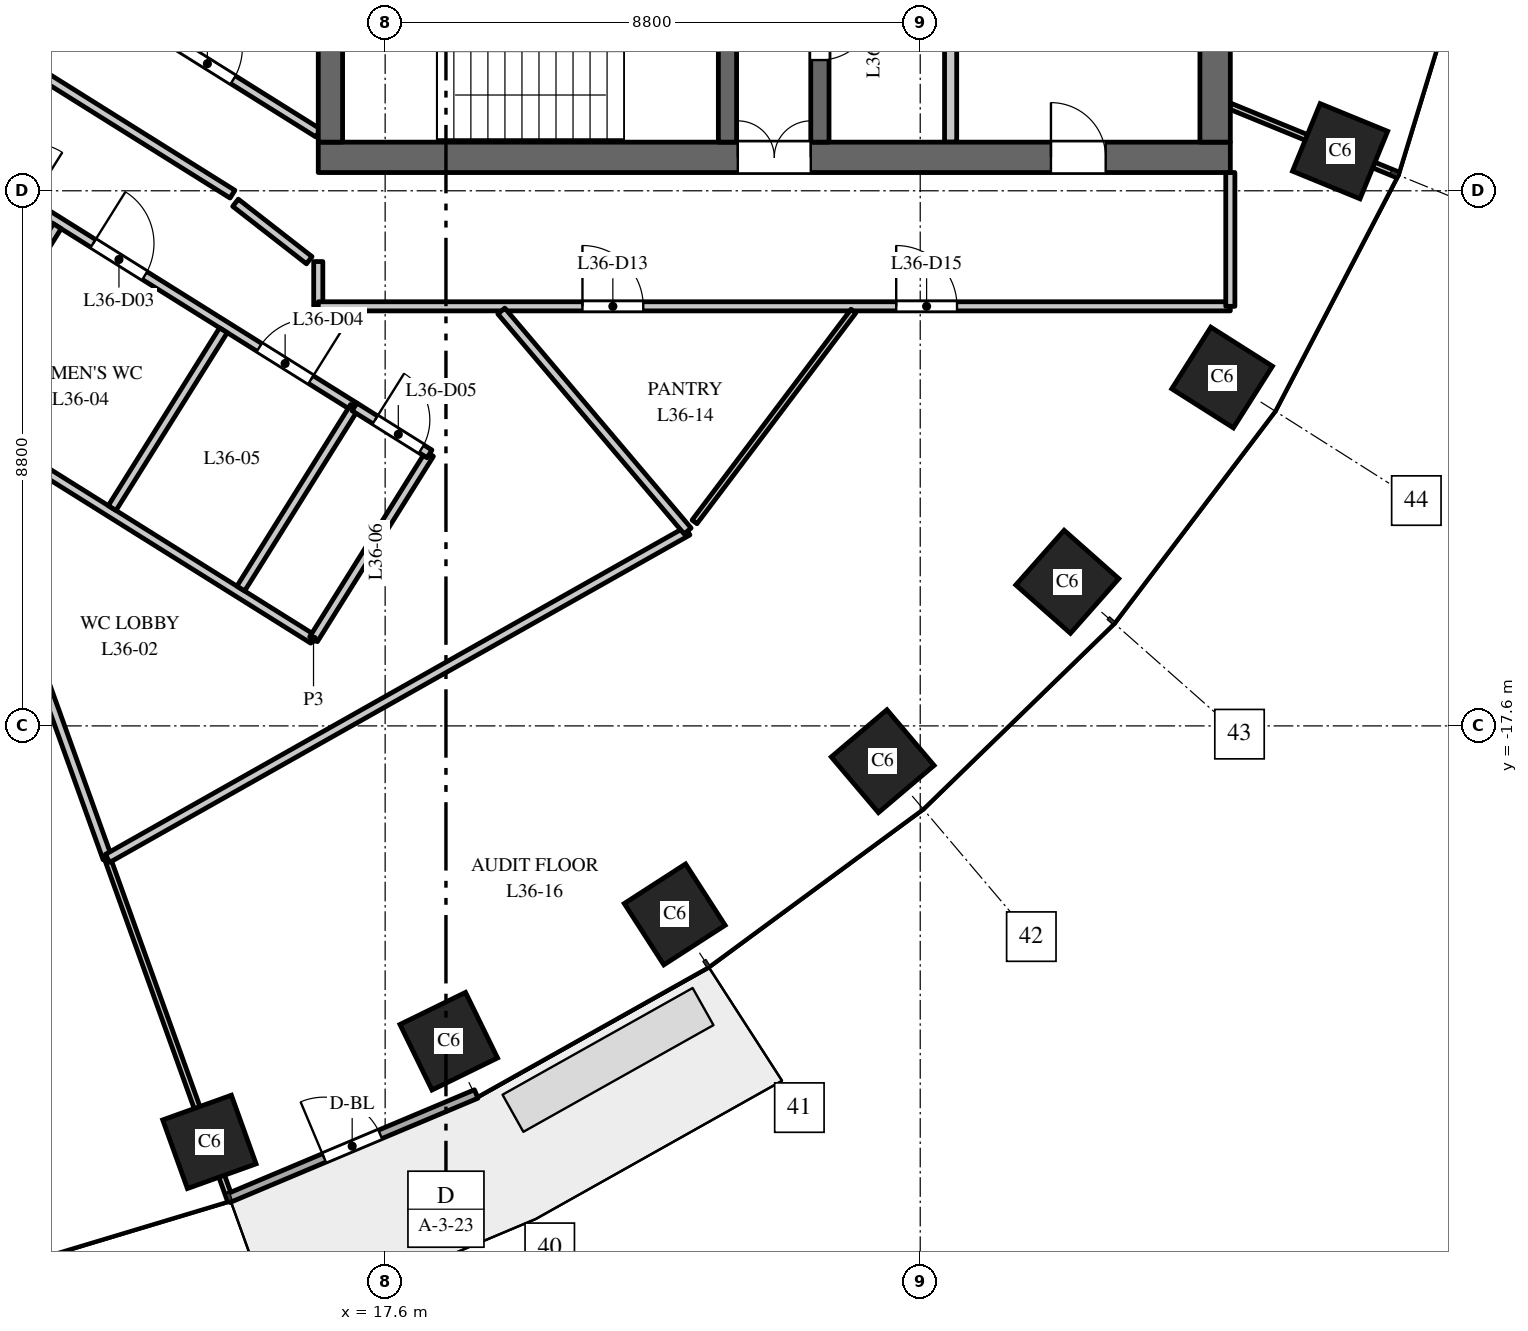
"""IFC4 building model, lengths in metres.
Left out: names, types, materials, properties, quantities, classifications, styles, units other than length and angle.
Written with IfcOpenShell. Run it as: python <this file> out.ifc"""

import sys

from ifc_helpers import new_model, si_unit, direction, frame, frame_2d, origin, origin_2d, place, context, subcontext, project, spatial, rectangle, extrude, element, fill, save


model = new_model("IFC4")
c1 = context("Model", 3, precision=1e-05, world=origin(), true_north=direction((0.0, 1.0)))
c2 = subcontext(c1, "Body", "Model", "MODEL_VIEW")
j1 = project(units=[si_unit("LENGTHUNIT", "METRE"), si_unit("PLANEANGLEUNIT", "RADIAN")], contexts=[c1])
p1 = place(None, origin())
s1 = spatial("IfcSite", under=j1, at=p1, CompositionType="ELEMENT")
p2 = place(p1, origin())
s2 = spatial("IfcBuilding", under=s1, at=p2, CompositionType="ELEMENT")
p3 = place(p2, frame((0.0, 0.0, 158.0)))
s3 = spatial("IfcBuildingStorey", under=s2, at=p3, CompositionType="ELEMENT", Elevation=158.0)
for number, where, z_axis, x_axis in (
    (1, (14.709, -24.441, 0.0), (0.0, 0.0, 1.0), (0.941, 0.338, 0.0)),
    (2, (18.646, -22.785, 0.0), (0.0, 0.0, 1.0), (0.898, 0.439, 0.0)),
    (3, (22.362, -20.7, 0.0), (0.0, 0.0, 1.0), (0.84, 0.542, 0.0)),
    (4, (25.783, -18.18, 0.0), (0.0, 0.0, 1.0), (0.763, 0.646, 0.0)),
    (5, (28.819, -15.23, 0.0), (0.0, 0.0, 1.0), (0.663, 0.749, 0.0)),
    (6, (31.365, -11.871, 0.0), (0.0, 0.0, 1.0), (0.535, 0.845, 0.0)),
    (7, (33.305, -8.149, 0.0), (0.0, 0.0, 1.0), (0.379, 0.925, 0.0)),
):
    element("IfcColumn", number, at=place(p3, frame(where, z_axis=z_axis, x_axis=x_axis)), inside=s3, PredefinedType="COLUMN", context=c2, shape_type="SweptSolid", body=[
        extrude(rectangle(XDim=1.2, YDim=1.2, at=origin_2d()), origin(), (0.0, 0.0, 1.0), 4.0),
    ])
p4 = place(p3, frame((16.5, -8.25, 0.0), z_axis=(0.0, 0.0, 1.0), x_axis=(1.0, 0.0, 0.0)))
e8 = element("IfcWall", 8, at=p4, inside=s3, PredefinedType="SHEAR", context=c2, shape_type="SweptSolid", body=[
    extrude(rectangle(XDim=15.0, YDim=0.5, at=frame_2d((7.5, 0.0))), origin(), (0.0, 0.0, 1.0), 3.7),
])
p5 = place(p4, frame((6.9, 0.0, 0.0)))
e9 = element("IfcOpeningElement", 9, at=p5, cuts=e8, PredefinedType="OPENING", context=c2, shape_type="SweptSolid", body=[
    extrude(rectangle(XDim=1.2, YDim=2.1, at=frame_2d((0.6, 1.05))), frame((0.0, 0.26, 0.0), z_axis=(0.0, -1.0, 0.0), x_axis=(1.0, 0.0, 0.0)), (0.0, 0.0, 1.0), 0.52),
])
p6 = place(p4, frame((12.05, 0.0, 0.0)))
e10 = element("IfcOpeningElement", 10, at=p6, cuts=e8, PredefinedType="OPENING", context=c2, shape_type="SweptSolid", body=[
    extrude(rectangle(XDim=0.9, YDim=2.1, at=frame_2d((0.45, 1.05))), frame((0.0, 0.26, 0.0), z_axis=(0.0, -1.0, 0.0), x_axis=(1.0, 0.0, 0.0)), (0.0, 0.0, 1.0), 0.52),
])
p7 = place(p3, frame((24.75, -8.0, 0.0), z_axis=(0.0, 0.0, 1.0), x_axis=(0.0, 1.0, 0.0)))
e11 = element("IfcWall", 11, at=p7, inside=s3, PredefinedType="SHEAR", context=c2, shape_type="SweptSolid", body=[
    extrude(rectangle(XDim=16.0, YDim=0.3, at=frame_2d((8.0, 0.0))), origin(), (0.0, 0.0, 1.0), 3.7),
])
p8 = place(p7, frame((4.425, 0.0, 0.0)))
e12 = element("IfcOpeningElement", 12, at=p8, cuts=e11, PredefinedType="OPENING", context=c2, shape_type="SweptSolid", body=[
    extrude(rectangle(XDim=1.1, YDim=2.1, at=frame_2d((0.55, 1.05))), frame((0.0, 0.16, 0.0), z_axis=(0.0, -1.0, 0.0), x_axis=(1.0, 0.0, 0.0)), (0.0, 0.0, 1.0), 0.32),
])
p9 = place(p7, frame((7.45, 0.0, 0.0)))
e13 = element("IfcOpeningElement", 13, at=p9, cuts=e11, PredefinedType="OPENING", context=c2, shape_type="SweptSolid", body=[
    extrude(rectangle(XDim=1.1, YDim=2.1, at=frame_2d((0.55, 1.05))), frame((0.0, 0.16, 0.0), z_axis=(0.0, -1.0, 0.0), x_axis=(1.0, 0.0, 0.0)), (0.0, 0.0, 1.0), 0.32),
])
p10 = place(p7, frame((10.475, 0.0, 0.0)))
e14 = element("IfcOpeningElement", 14, at=p10, cuts=e11, PredefinedType="OPENING", context=c2, shape_type="SweptSolid", body=[
    extrude(rectangle(XDim=1.1, YDim=2.1, at=frame_2d((0.55, 1.05))), frame((0.0, 0.16, 0.0), z_axis=(0.0, -1.0, 0.0), x_axis=(1.0, 0.0, 0.0)), (0.0, 0.0, 1.0), 0.32),
])
p11 = place(p7, frame((13.75, 0.0, 0.0)))
e15 = element("IfcOpeningElement", 15, at=p11, cuts=e11, PredefinedType="OPENING", context=c2, shape_type="SweptSolid", body=[
    extrude(rectangle(XDim=0.9, YDim=2.1, at=frame_2d((0.45, 1.05))), frame((0.0, 0.16, 0.0), z_axis=(0.0, -1.0, 0.0), x_axis=(1.0, 0.0, 0.0)), (0.0, 0.0, 1.0), 0.32),
])
p12 = place(p7, frame((1.35, 0.0, 0.0)))
e16 = element("IfcOpeningElement", 16, at=p12, cuts=e11, PredefinedType="OPENING", context=c2, shape_type="SweptSolid", body=[
    extrude(rectangle(XDim=0.9, YDim=2.1, at=frame_2d((0.45, 1.05))), frame((0.0, 0.16, 0.0), z_axis=(0.0, -1.0, 0.0), x_axis=(1.0, 0.0, 0.0)), (0.0, 0.0, 1.0), 0.32),
])
p13 = place(p3, frame((16.7, -8.0, 0.0), z_axis=(0.0, 0.0, 1.0), x_axis=(0.0, 1.0, 0.0)))
e17 = element("IfcWall", 17, at=p13, inside=s3, PredefinedType="SHEAR", context=c2, shape_type="SweptSolid", body=[
    extrude(rectangle(XDim=16.0, YDim=0.4, at=frame_2d((8.0, 0.0))), origin(), (0.0, 0.0, 1.0), 3.7),
])
p14 = place(p3, frame((31.25, -8.0, 0.0), z_axis=(0.0, 0.0, 1.0), x_axis=(0.0, 1.0, 0.0)))
e18 = element("IfcWall", 18, at=p14, inside=s3, PredefinedType="SHEAR", context=c2, shape_type="SweptSolid", body=[
    extrude(rectangle(XDim=16.0, YDim=0.5, at=frame_2d((8.0, 0.0))), origin(), (0.0, 0.0, 1.0), 3.7),
])
p15 = place(p3, frame((26.9, -8.0, 0.0), z_axis=(0.0, 0.0, 1.0), x_axis=(0.0, 1.0, 0.0)))
e19 = element("IfcWall", 19, at=p15, inside=s3, PredefinedType="PARTITIONING", context=c2, shape_type="SweptSolid", body=[
    extrude(rectangle(XDim=3.25, YDim=0.2, at=frame_2d((1.625, 0.0))), origin(), (0.0, 0.0, 1.0), 3.7),
])
p16 = place(p3, frame((23.23, -8.0, 0.0), z_axis=(0.0, 0.0, 1.0), x_axis=(0.0, 1.0, 0.0)))
e20 = element("IfcWall", 20, at=p16, inside=s3, PredefinedType="SHEAR", context=c2, shape_type="SweptSolid", body=[
    extrude(rectangle(XDim=7.875, YDim=0.3, at=frame_2d((3.938, 0.0))), origin(), (0.0, 0.0, 1.0), 3.7),
])
p17 = place(p16, frame((5.15, 0.0, 0.0)))
e21 = element("IfcOpeningElement", 21, at=p17, cuts=e20, PredefinedType="OPENING", context=c2, shape_type="SweptSolid", body=[
    extrude(rectangle(XDim=1.1, YDim=2.1, at=frame_2d((0.55, 1.05))), frame((0.0, 0.16, 0.0), z_axis=(0.0, -1.0, 0.0), x_axis=(1.0, 0.0, 0.0)), (0.0, 0.0, 1.0), 0.32),
])
p18 = place(p3, frame((15.018, -25.369, 0.0), z_axis=(0.0, 0.0, 1.0), x_axis=(0.921816985161, 0.387625393736, 0.0)))
e22 = element("IfcWall", 22, at=p18, inside=s3, PredefinedType="STANDARD", context=c2, shape_type="SweptSolid", body=[
    extrude(rectangle(XDim=4.426, YDim=0.15, at=frame_2d((2.213, 0.0))), origin(), (0.0, 0.0, 1.0), 3.7),
])
p19 = place(p18, frame((1.713, 0.0, 0.0)))
e23 = element("IfcOpeningElement", 23, at=p19, cuts=e22, PredefinedType="OPENING", context=c2, shape_type="SweptSolid", body=[
    extrude(rectangle(XDim=1.0, YDim=2.4, at=frame_2d((0.5, 1.2))), frame((0.0, 0.085, 0.0), z_axis=(0.0, -1.0, 0.0), x_axis=(1.0, 0.0, 0.0)), (0.0, 0.0, 1.0), 0.17),
])
p20 = place(p3, frame((7.608, -10.661, 0.0), z_axis=(0.0, 0.0, 1.0), x_axis=(0.847562482532, -0.530695617284, 0.0)))
e24 = element("IfcWall", 24, at=p20, inside=s3, PredefinedType="PARTITIONING", context=c2, shape_type="SweptSolid", body=[
    extrude(rectangle(XDim=10.392, YDim=0.15, at=frame_2d((5.196, 0.0))), origin(), (0.0, 0.0, 1.0), 3.7),
])
p21 = place(p3, frame((9.514, -7.61, 0.0), z_axis=(0.0, 0.0, 1.0), x_axis=(0.847740567707, -0.530411095155, 0.0)))
e25 = element("IfcWall", 25, at=p21, inside=s3, PredefinedType="PARTITIONING", context=c2, shape_type="SweptSolid", body=[
    extrude(rectangle(XDim=8.944, YDim=0.15, at=frame_2d((4.472, 0.0))), origin(), (0.0, 0.0, 1.0), 3.7),
])
p22 = place(p21, frame((1.65, 0.0, 0.0)))
e26 = element("IfcOpeningElement", 26, at=p22, cuts=e25, PredefinedType="OPENING", context=c2, shape_type="SweptSolid", body=[
    extrude(rectangle(XDim=1.0, YDim=2.1, at=frame_2d((0.5, 1.05))), frame((0.0, 0.085, 0.0), z_axis=(0.0, -1.0, 0.0), x_axis=(1.0, 0.0, 0.0)), (0.0, 0.0, 1.0), 0.17),
])
p23 = place(p21, frame((3.874, 0.0, 0.0)))
e27 = element("IfcOpeningElement", 27, at=p23, cuts=e25, PredefinedType="OPENING", context=c2, shape_type="SweptSolid", body=[
    extrude(rectangle(XDim=1.0, YDim=2.1, at=frame_2d((0.5, 1.05))), frame((0.0, 0.085, 0.0), z_axis=(0.0, -1.0, 0.0), x_axis=(1.0, 0.0, 0.0)), (0.0, 0.0, 1.0), 0.17),
])
p24 = place(p21, frame((7.098, 0.0, 0.0)))
e28 = element("IfcOpeningElement", 28, at=p24, cuts=e25, PredefinedType="OPENING", context=c2, shape_type="SweptSolid", body=[
    extrude(rectangle(XDim=1.0, YDim=2.1, at=frame_2d((0.5, 1.05))), frame((0.0, 0.085, 0.0), z_axis=(0.0, -1.0, 0.0), x_axis=(1.0, 0.0, 0.0)), (0.0, 0.0, 1.0), 0.17),
])
p25 = place(p3, frame((9.679, -5.469, 0.0), z_axis=(0.0, 0.0, 1.0), x_axis=(0.847602682855, -0.530631408811, 0.0)))
e29 = element("IfcWall", 29, at=p25, inside=s3, PredefinedType="PARTITIONING", context=c2, shape_type="SweptSolid", body=[
    extrude(rectangle(XDim=6.383, YDim=0.15, at=frame_2d((3.191, 0.0))), origin(), (0.0, 0.0, 1.0), 3.7),
])
p26 = place(p25, frame((0.65, 0.0, 0.0)))
e30 = element("IfcOpeningElement", 30, at=p26, cuts=e29, PredefinedType="OPENING", context=c2, shape_type="SweptSolid", body=[
    extrude(rectangle(XDim=1.0, YDim=2.1, at=frame_2d((0.5, 1.05))), frame((0.0, 0.085, 0.0), z_axis=(0.0, -1.0, 0.0), x_axis=(1.0, 0.0, 0.0)), (0.0, 0.0, 1.0), 0.17),
])
p27 = place(p3, frame((10.377, -12.306, 0.0), z_axis=(0.0, 0.0, 1.0), x_axis=(0.530889428354, 0.847441098167, 0.0)))
e31 = element("IfcWall", 31, at=p27, inside=s3, PredefinedType="PARTITIONING", context=c2, shape_type="SweptSolid", body=[
    extrude(rectangle(XDim=3.449, YDim=0.15, at=frame_2d((1.725, 0.0))), origin(), (0.0, 0.0, 1.0), 3.7),
])
p28 = place(p3, frame((10.752, -4.254, 0.0), z_axis=(0.0, 0.0, 1.0), x_axis=(0.847690706888, -0.530490777917, 0.0)))
e32 = element("IfcWall", 32, at=p28, inside=s3, PredefinedType="PARTITIONING", context=c2, shape_type="SweptSolid", body=[
    extrude(rectangle(XDim=6.781, YDim=0.15, at=frame_2d((3.39, 0.0))), origin(), (0.0, 0.0, 1.0), 3.7),
])
p29 = place(p28, frame((4.129, 0.0, 0.0)))
e33 = element("IfcOpeningElement", 33, at=p29, cuts=e32, PredefinedType="OPENING", context=c2, shape_type="SweptSolid", body=[
    extrude(rectangle(XDim=1.0, YDim=2.1, at=frame_2d((0.5, 1.05))), frame((0.0, 0.085, 0.0), z_axis=(0.0, -1.0, 0.0), x_axis=(1.0, 0.0, 0.0)), (0.0, 0.0, 1.0), 0.17),
])
p30 = place(p3, frame((11.429, -15.32, 0.0), z_axis=(0.0, 0.0, 1.0), x_axis=(0.338520464006, -0.940959029634, 0.0)))
e34 = element("IfcWall", 34, at=p30, inside=s3, PredefinedType="PARTITIONING", context=c2, shape_type="SweptSolid", body=[
    extrude(rectangle(XDim=4.735, YDim=0.15, at=frame_2d((2.368, 0.0))), origin(), (0.0, 0.0, 1.0), 3.7),
])
p31 = place(p3, frame((13.032, -19.776, 0.0), z_axis=(0.0, 0.0, 1.0), x_axis=(0.338352371411, -0.941019485856, 0.0)))
e35 = element("IfcWall", 35, at=p31, inside=s3, PredefinedType="PARTITIONING", context=c2, shape_type="SweptSolid", body=[
    extrude(rectangle(XDim=5.959, YDim=0.1, at=frame_2d((2.979, 0.0))), origin(), (0.0, 0.0, 1.0), 2.85),
])
p32 = place(p3, frame((13.034, -19.779, 0.0), z_axis=(0.0, 0.0, 1.0), x_axis=(0.870903388322, 0.491454258512, 0.0)))
e36 = element("IfcWall", 36, at=p32, inside=s3, PredefinedType="PARTITIONING", context=c2, shape_type="SweptSolid", body=[
    extrude(rectangle(XDim=10.955, YDim=0.15, at=frame_2d((5.478, 0.0))), origin(), (0.0, 0.0, 1.0), 3.7),
])
p33 = place(p3, frame((13.11, -14.017, 0.0), z_axis=(0.0, 0.0, 1.0), x_axis=(0.530603340991, 0.847620253727, 0.0)))
e37 = element("IfcWall", 37, at=p33, inside=s3, PredefinedType="PARTITIONING", context=c2, shape_type="SweptSolid", body=[
    extrude(rectangle(XDim=3.448, YDim=0.15, at=frame_2d((1.724, 0.0))), origin(), (0.0, 0.0, 1.0), 3.7),
])
p34 = place(p3, frame((15.226, -15.341, 0.0), z_axis=(0.0, 0.0, 1.0), x_axis=(0.530602850446, 0.847620560805, 0.0)))
e38 = element("IfcWall", 38, at=p34, inside=s3, PredefinedType="PARTITIONING", context=c2, shape_type="SweptSolid", body=[
    extrude(rectangle(XDim=3.524, YDim=0.15, at=frame_2d((1.762, 0.0))), origin(), (0.0, 0.0, 1.0), 3.7),
])
p35 = place(p3, frame((16.422, -16.175, 0.0), z_axis=(0.0, 0.0, 1.0), x_axis=(0.530578570881, 0.84763575911, 0.0)))
e39 = element("IfcWall", 39, at=p35, inside=s3, PredefinedType="PARTITIONING", context=c2, shape_type="SweptSolid", body=[
    extrude(rectangle(XDim=3.596, YDim=0.15, at=frame_2d((1.798, 0.0))), origin(), (0.0, 0.0, 1.0), 3.7),
])
p36 = place(p3, frame((16.5, -10.7, 0.0), z_axis=(0.0, 0.0, 1.0), x_axis=(0.0, 1.0, 0.0)))
e40 = element("IfcWall", 40, at=p36, inside=s3, PredefinedType="PARTITIONING", context=c2, shape_type="SweptSolid", body=[
    extrude(rectangle(XDim=0.736, YDim=0.15, at=frame_2d((0.368, 0.0))), origin(), (0.0, 0.0, 1.0), 3.7),
])
p37 = place(p3, frame((16.5, -10.7, 0.0), z_axis=(0.0, 0.0, 1.0), x_axis=(1.0, 0.0, 0.0)))
e41 = element("IfcWall", 41, at=p37, inside=s3, PredefinedType="PARTITIONING", context=c2, shape_type="SweptSolid", body=[
    extrude(rectangle(XDim=15.0, YDim=0.15, at=frame_2d((7.5, 0.0))), origin(), (0.0, 0.0, 1.0), 2.75),
])
p38 = place(p37, frame((4.345, 0.0, 0.0)))
e42 = element("IfcOpeningElement", 42, at=p38, cuts=e41, PredefinedType="OPENING", context=c2, shape_type="SweptSolid", body=[
    extrude(rectangle(XDim=1.0, YDim=2.1, at=frame_2d((0.5, 1.05))), frame((0.0, 0.085, 0.0), z_axis=(0.0, -1.0, 0.0), x_axis=(1.0, 0.0, 0.0)), (0.0, 0.0, 1.0), 0.17),
])
p39 = place(p37, frame((9.505, 0.0, 0.0)))
e43 = element("IfcOpeningElement", 43, at=p39, cuts=e41, PredefinedType="OPENING", context=c2, shape_type="SweptSolid", body=[
    extrude(rectangle(XDim=1.0, YDim=2.1, at=frame_2d((0.5, 1.05))), frame((0.0, 0.085, 0.0), z_axis=(0.0, -1.0, 0.0), x_axis=(1.0, 0.0, 0.0)), (0.0, 0.0, 1.0), 0.17),
])
p40 = place(p3, frame((17.096, -12.354, 0.0), z_axis=(0.0, 0.0, 1.0), x_axis=(0.847498728789, -0.530797423412, 0.0)))
e44 = element("IfcWall", 44, at=p40, inside=s3, PredefinedType="PARTITIONING", context=c2, shape_type="SweptSolid", body=[
    extrude(rectangle(XDim=1.456, YDim=0.15, at=frame_2d((0.728, 0.0))), origin(), (0.0, 0.0, 1.0), 3.7),
])
p41 = place(p40, frame((0.4, 0.0, 0.0)))
e45 = element("IfcOpeningElement", 45, at=p41, cuts=e44, PredefinedType="OPENING", context=c2, shape_type="SweptSolid", body=[
    extrude(rectangle(XDim=0.9, YDim=2.1, at=frame_2d((0.45, 1.05))), frame((0.0, 0.085, 0.0), z_axis=(0.0, -1.0, 0.0), x_axis=(1.0, 0.0, 0.0)), (0.0, 0.0, 1.0), 0.17),
])
p42 = place(p3, frame((19.511, -10.778, 0.0), z_axis=(0.0, 0.0, 1.0), x_axis=(0.646369264436, -0.763024753197, 0.0)))
e46 = element("IfcWall", 46, at=p42, inside=s3, PredefinedType="PARTITIONING", context=c2, shape_type="SweptSolid", body=[
    extrude(rectangle(XDim=4.74, YDim=0.15, at=frame_2d((2.37, 0.0))), origin(), (0.0, 0.0, 1.0), 3.7),
])
p43 = place(p3, frame((22.688, -14.245, 0.0), z_axis=(0.0, 0.0, 1.0), x_axis=(0.6020222506, 0.798479310804, 0.0)))
e47 = element("IfcWall", 47, at=p43, inside=s3, PredefinedType="PARTITIONING", context=c2, shape_type="SweptSolid", body=[
    extrude(rectangle(XDim=4.342, YDim=0.1, at=frame_2d((2.171, 0.0))), origin(), (0.0, 0.0, 1.0), 2.75),
])
p44 = place(p3, frame((31.5, -10.7, 0.0), z_axis=(0.0, 0.0, 1.0), x_axis=(0.0, 1.0, 0.0)))
e48 = element("IfcWall", 48, at=p44, inside=s3, PredefinedType="PARTITIONING", context=c2, shape_type="SweptSolid", body=[
    extrude(rectangle(XDim=2.2, YDim=0.15, at=frame_2d((1.1, 0.0))), origin(), (0.0, 0.0, 1.0), 2.9),
])
p45 = place(p3, frame((31.5, -7.41, 0.0), z_axis=(0.0, 0.0, 1.0), x_axis=(0.925344112436, -0.379128307542, 0.0)))
e49 = element("IfcWall", 49, at=p45, inside=s3, PredefinedType="PARTITIONING", context=c2, shape_type="SweptSolid", body=[
    extrude(rectangle(XDim=2.954, YDim=0.1, at=frame_2d((1.477, 0.0))), origin(), (0.0, 0.0, 1.0), 3.7),
])
p46 = place(p3, frame((16.352, -9.942, 0.0), z_axis=(0.0, 0.0, 1.0), x_axis=(-0.788950226826, 0.614457109643, 0.0)))
e50 = element("IfcWall", 50, at=p46, inside=s3, PredefinedType="PARTITIONING", context=c2, shape_type="SweptSolid", body=[
    extrude(rectangle(XDim=1.538, YDim=0.15, at=frame_2d((0.769, 0.0))), origin(), (0.0, 0.0, 1.0), 3.7),
])
p47 = place(p5, origin())
e51 = element("IfcDoor", 51, at=p47, inside=s3, OperationType="DOUBLE_DOOR_DOUBLE_SWING", PredefinedType="DOOR", context=c2, shape_type="SweptSolid", body=[
    extrude(rectangle(XDim=1.2, YDim=2.1, at=frame_2d((0.6, 1.05))), frame((0.0, 0.025, 0.0), z_axis=(0.0, -1.0, 0.0), x_axis=(1.0, 0.0, 0.0)), (0.0, 0.0, 1.0), 0.05),
])
fill(e9, e51)
p48 = place(p12, origin())
e52 = element("IfcDoor", 52, at=p48, inside=s3, OperationType="SINGLE_SWING_RIGHT", PredefinedType="DOOR", context=c2, shape_type="SweptSolid", body=[
    extrude(rectangle(XDim=0.9, YDim=2.1, at=frame_2d((0.45, 1.05))), frame((0.0, 0.025, 0.0), z_axis=(0.0, -1.0, 0.0), x_axis=(1.0, 0.0, 0.0)), (0.0, 0.0, 1.0), 0.05),
])
fill(e16, e52)
p49 = place(p6, origin())
e53 = element("IfcDoor", 53, at=p49, inside=s3, OperationType="SINGLE_SWING_RIGHT", PredefinedType="DOOR", context=c2, shape_type="SweptSolid", body=[
    extrude(rectangle(XDim=0.9, YDim=2.1, at=frame_2d((0.45, 1.05))), frame((0.0, 0.025, 0.0), z_axis=(0.0, -1.0, 0.0), x_axis=(1.0, 0.0, 0.0)), (0.0, 0.0, 1.0), 0.05),
])
fill(e10, e53)
p50 = place(p19, origin())
e54 = element("IfcDoor", 54, at=p50, inside=s3, OperationType="SINGLE_SWING_LEFT", PredefinedType="DOOR", context=c2, shape_type="SweptSolid", body=[
    extrude(rectangle(XDim=1.0, YDim=2.4, at=frame_2d((0.5, 1.2))), frame((0.0, 0.025, 0.0), z_axis=(0.0, -1.0, 0.0), x_axis=(1.0, 0.0, 0.0)), (0.0, 0.0, 1.0), 0.05),
])
fill(e23, e54)
p51 = place(p23, origin())
e55 = element("IfcDoor", 55, at=p51, inside=s3, OperationType="SINGLE_SWING_LEFT", PredefinedType="DOOR", context=c2, shape_type="SweptSolid", body=[
    extrude(rectangle(XDim=1.0, YDim=2.1, at=frame_2d((0.5, 1.05))), frame((0.0, 0.025, 0.0), z_axis=(0.0, -1.0, 0.0), x_axis=(1.0, 0.0, 0.0)), (0.0, 0.0, 1.0), 0.05),
])
fill(e27, e55)
p52 = place(p24, origin())
e56 = element("IfcDoor", 56, at=p52, inside=s3, OperationType="SINGLE_SWING_RIGHT", PredefinedType="DOOR", context=c2, shape_type="SweptSolid", body=[
    extrude(rectangle(XDim=1.0, YDim=2.1, at=frame_2d((0.5, 1.05))), frame((0.0, 0.025, 0.0), z_axis=(0.0, -1.0, 0.0), x_axis=(1.0, 0.0, 0.0)), (0.0, 0.0, 1.0), 0.05),
])
fill(e28, e56)
p53 = place(p41, origin())
e57 = element("IfcDoor", 57, at=p53, inside=s3, OperationType="SINGLE_SWING_LEFT", PredefinedType="DOOR", context=c2, shape_type="SweptSolid", body=[
    extrude(rectangle(XDim=0.9, YDim=2.1, at=frame_2d((0.45, 1.05))), frame((0.0, 0.025, 0.0), z_axis=(0.0, -1.0, 0.0), x_axis=(1.0, 0.0, 0.0)), (0.0, 0.0, 1.0), 0.05),
])
fill(e45, e57)
p54 = place(p38, origin())
e58 = element("IfcDoor", 58, at=p54, inside=s3, OperationType="SINGLE_SWING_LEFT", PredefinedType="DOOR", context=c2, shape_type="SweptSolid", body=[
    extrude(rectangle(XDim=1.0, YDim=2.1, at=frame_2d((0.5, 1.05))), frame((0.0, 0.025, 0.0), z_axis=(0.0, -1.0, 0.0), x_axis=(1.0, 0.0, 0.0)), (0.0, 0.0, 1.0), 0.05),
])
fill(e42, e58)
p55 = place(p39, origin())
e59 = element("IfcDoor", 59, at=p55, inside=s3, OperationType="SINGLE_SWING_LEFT", PredefinedType="DOOR", context=c2, shape_type="SweptSolid", body=[
    extrude(rectangle(XDim=1.0, YDim=2.1, at=frame_2d((0.5, 1.05))), frame((0.0, 0.025, 0.0), z_axis=(0.0, -1.0, 0.0), x_axis=(1.0, 0.0, 0.0)), (0.0, 0.0, 1.0), 0.05),
])
fill(e43, e59)
p56 = place(p29, origin())
e60 = element("IfcDoor", 60, at=p56, inside=s3, OperationType="SINGLE_SWING_LEFT", PredefinedType="DOOR", context=c2, shape_type="SweptSolid", body=[
    extrude(rectangle(XDim=1.0, YDim=2.1, at=frame_2d((0.5, 1.05))), frame((0.0, 0.025, 0.0), z_axis=(0.0, -1.0, 0.0), x_axis=(1.0, 0.0, 0.0)), (0.0, 0.0, 1.0), 0.05),
])
fill(e33, e60)
save(model, sys.argv[1])
